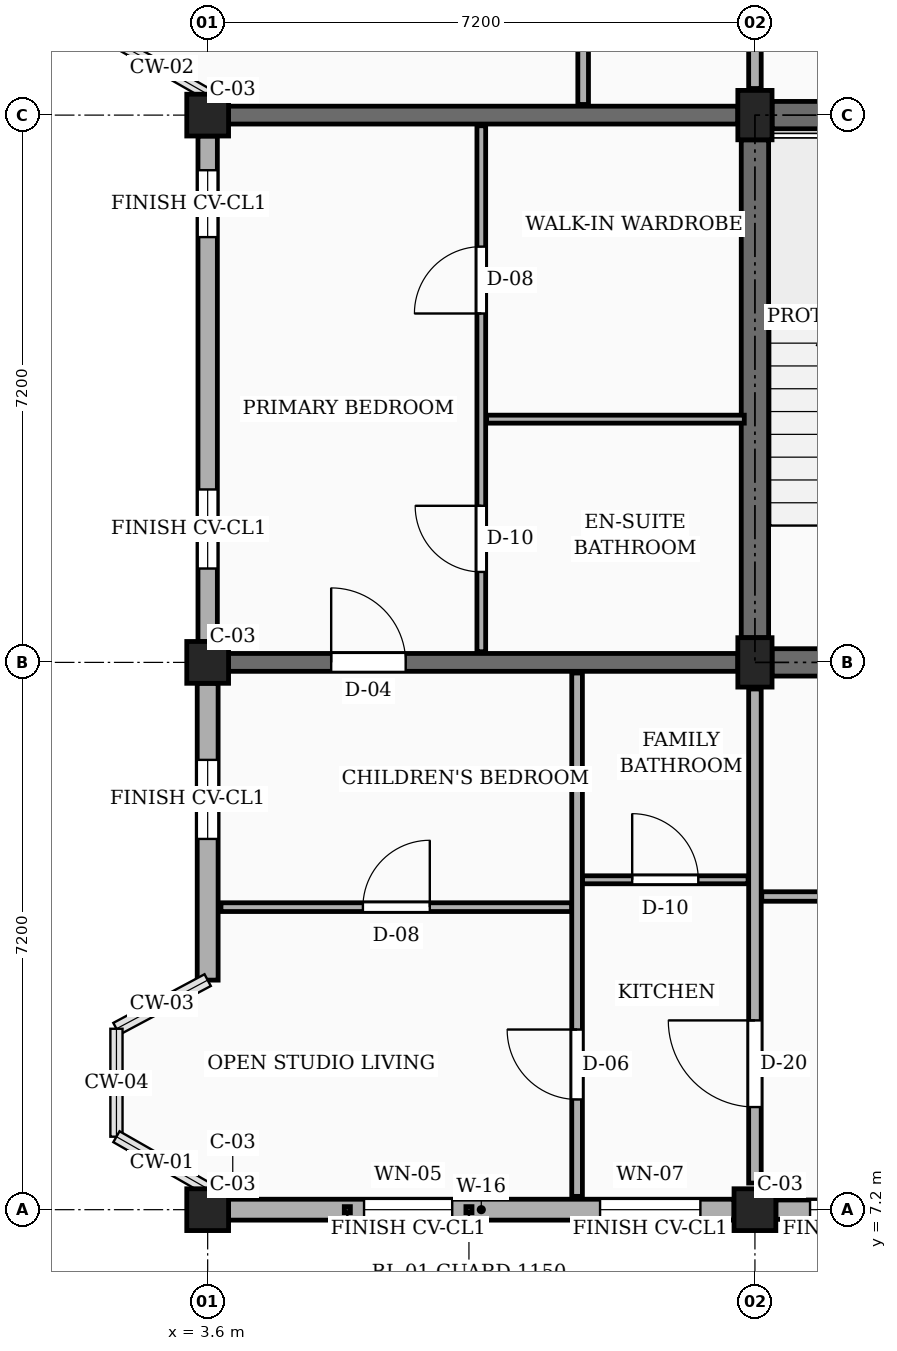
"""IFC4 building model, lengths in metres.
Left out: names, types, materials, properties, quantities, classifications, styles, units other than length and angle.
Written with IfcOpenShell. Run it as: python <this file> out.ifc"""

import sys

from ifc_helpers import new_model, si_unit, direction, frame, frame_2d, origin, origin_2d, place, context, subcontext, project, spatial, rectangle, extrude, element, fill, save


model = new_model("IFC4")
c1 = context("Model", 3, precision=1e-05, world=origin(), true_north=direction((0.0, 1.0)))
c2 = subcontext(c1, "Body", "Model", "MODEL_VIEW")
j1 = project(units=[si_unit("LENGTHUNIT", "METRE"), si_unit("PLANEANGLEUNIT", "RADIAN")], contexts=[c1])
p1 = place(None, origin())
s1 = spatial("IfcSite", under=j1, at=p1, CompositionType="ELEMENT")
p2 = place(p1, origin())
s2 = spatial("IfcBuilding", under=s1, at=p2, CompositionType="ELEMENT")
p3 = place(p2, frame((0.0, 0.0, 13.95)))
s3 = spatial("IfcBuildingStorey", under=s2, at=p3, CompositionType="ELEMENT", Elevation=13.95)
for number, where, z_axis, x_axis in (
    (1, (3.6, 7.2, 0.0), (0.0, 0.0, 1.0), (1.0, 0.0, 0.0)),
    (2, (3.6, 14.4, 0.0), (0.0, 0.0, 1.0), (1.0, 0.0, 0.0)),
    (3, (3.6, 21.6, 0.0), (0.0, 0.0, 1.0), (1.0, 0.0, 0.0)),
    (4, (10.8, 7.2, 0.0), (0.0, 0.0, 1.0), (1.0, 0.0, 0.0)),
):
    element("IfcColumn", number, at=place(p3, frame(where, z_axis=z_axis, x_axis=x_axis)), inside=s3, PredefinedType="COLUMN", context=c2, shape_type="SweptSolid", body=[
        extrude(rectangle(XDim=0.55, YDim=0.55, at=origin_2d()), origin(), (0.0, 0.0, 1.0), 3.15),
    ])
for number, where, z_axis, x_axis in (
    (5, (10.8, 14.4, 0.0), (0.0, 0.0, 1.0), (1.0, 0.0, 0.0)),
    (6, (10.8, 21.6, 0.0), (0.0, 0.0, 1.0), (1.0, 0.0, 0.0)),
):
    element("IfcColumn", number, at=place(p3, frame(where, z_axis=z_axis, x_axis=x_axis)), inside=s3, PredefinedType="COLUMN", context=c2, shape_type="SweptSolid", body=[
        extrude(rectangle(XDim=0.45, YDim=0.65, at=origin_2d()), origin(), (0.0, 0.0, 1.0), 3.15),
    ])
p4 = place(p3, frame((3.875, 14.4, 0.0), z_axis=(0.0, 0.0, 1.0), x_axis=(1.0, 0.0, 0.0)))
e7 = element("IfcWall", 7, at=p4, inside=s3, PredefinedType="SOLIDWALL", context=c2, shape_type="SweptSolid", body=[
    extrude(rectangle(XDim=6.7, YDim=0.235, at=frame_2d((3.35, 0.0))), origin(), (0.0, 0.0, 1.0), 2.17),
])
p5 = place(p4, frame((1.35, 0.0, 0.0)))
e8 = element("IfcOpeningElement", 8, at=p5, cuts=e7, PredefinedType="OPENING", context=c2, shape_type="SweptSolid", body=[
    extrude(rectangle(XDim=0.98, YDim=2.12, at=frame_2d((0.49, 1.06))), frame((0.0, 0.127, 0.0), z_axis=(0.0, -1.0, 0.0), x_axis=(1.0, 0.0, 0.0)), (0.0, 0.0, 1.0), 0.255),
])
p6 = place(p3, frame((3.875, 21.6, 0.0), z_axis=(0.0, 0.0, 1.0), x_axis=(1.0, 0.0, 0.0)))
e9 = element("IfcWall", 9, at=p6, inside=s3, PredefinedType="SOLIDWALL", context=c2, shape_type="SweptSolid", body=[
    extrude(rectangle(XDim=6.7, YDim=0.235, at=frame_2d((3.35, 0.0))), origin(), (0.0, 0.0, 1.0), 2.17),
])
p7 = place(p3, frame((3.875, 7.2, 0.0), z_axis=(0.0, 0.0, 1.0), x_axis=(1.0, 0.0, 0.0)))
e10 = element("IfcWall", 10, at=p7, inside=s3, PredefinedType="SOLIDWALL", context=c2, shape_type="SweptSolid", body=[
    extrude(rectangle(XDim=6.65, YDim=0.275, at=frame_2d((3.325, 0.0))), origin(), (0.0, 0.0, 1.0), 2.44),
])
p8 = place(p7, frame((1.782, 0.0, 0.78)))
e11 = element("IfcOpeningElement", 11, at=p8, cuts=e10, PredefinedType="OPENING", context=c2, shape_type="SweptSolid", body=[
    extrude(rectangle(XDim=1.16, YDim=1.15, at=frame_2d((0.58, 0.575))), frame((0.0, 0.147, 0.0), z_axis=(0.0, -1.0, 0.0), x_axis=(1.0, 0.0, 0.0)), (0.0, 0.0, 1.0), 0.295),
])
p9 = place(p7, frame((4.887, 0.0, 0.78)))
e12 = element("IfcOpeningElement", 12, at=p9, cuts=e10, PredefinedType="OPENING", context=c2, shape_type="SweptSolid", body=[
    extrude(rectangle(XDim=1.32, YDim=1.15, at=frame_2d((0.66, 0.575))), frame((0.0, 0.147, 0.0), z_axis=(0.0, -1.0, 0.0), x_axis=(1.0, 0.0, 0.0)), (0.0, 0.0, 1.0), 0.295),
])
p10 = place(p3, frame((11.075, 7.2, 0.0), z_axis=(0.0, 0.0, 1.0), x_axis=(1.0, 0.0, 0.0)))
e13 = element("IfcWall", 13, at=p10, inside=s3, PredefinedType="SOLIDWALL", context=c2, shape_type="SweptSolid", body=[
    extrude(rectangle(XDim=6.65, YDim=0.255, at=frame_2d((3.325, 0.0))), origin(), (0.0, 0.0, 1.0), 2.44),
])
p11 = place(p10, frame((0.45, 0.0, 0.78)))
e14 = element("IfcOpeningElement", 14, at=p11, cuts=e13, PredefinedType="OPENING", context=c2, shape_type="SweptSolid", body=[
    extrude(rectangle(XDim=1.32, YDim=1.15, at=frame_2d((0.66, 0.575))), frame((0.0, 0.137, 0.0), z_axis=(0.0, -1.0, 0.0), x_axis=(1.0, 0.0, 0.0)), (0.0, 0.0, 1.0), 0.275),
])
p12 = place(p10, frame((4.65, 0.0, 0.78)))
e15 = element("IfcOpeningElement", 15, at=p12, cuts=e13, PredefinedType="OPENING", context=c2, shape_type="SweptSolid", body=[
    extrude(rectangle(XDim=0.88, YDim=1.26, at=frame_2d((0.44, 0.63))), frame((0.0, 0.137, 0.0), z_axis=(0.0, -1.0, 0.0), x_axis=(1.0, 0.0, 0.0)), (0.0, 0.0, 1.0), 0.275),
])
p13 = place(p3, frame((3.6, 21.325, 0.0), z_axis=(0.0, 0.0, 1.0), x_axis=(0.0, -1.0, 0.0)))
e16 = element("IfcWall", 16, at=p13, inside=s3, PredefinedType="SOLIDWALL", context=c2, shape_type="SweptSolid", body=[
    extrude(rectangle(XDim=6.65, YDim=0.255, at=frame_2d((3.325, 0.0))), origin(), (0.0, 0.0, 1.0), 2.44),
])
p14 = place(p13, frame((0.45, 0.0, 0.78)))
e17 = element("IfcOpeningElement", 17, at=p14, cuts=e16, PredefinedType="OPENING", context=c2, shape_type="SweptSolid", body=[
    extrude(rectangle(XDim=0.88, YDim=1.26, at=frame_2d((0.44, 0.63))), frame((0.0, 0.137, 0.0), z_axis=(0.0, -1.0, 0.0), x_axis=(1.0, 0.0, 0.0)), (0.0, 0.0, 1.0), 0.275),
])
p15 = place(p13, frame((4.65, 0.0, 0.78)))
e18 = element("IfcOpeningElement", 18, at=p15, cuts=e16, PredefinedType="OPENING", context=c2, shape_type="SweptSolid", body=[
    extrude(rectangle(XDim=1.04, YDim=1.26, at=frame_2d((0.52, 0.63))), frame((0.0, 0.137, 0.0), z_axis=(0.0, -1.0, 0.0), x_axis=(1.0, 0.0, 0.0)), (0.0, 0.0, 1.0), 0.275),
])
p16 = place(p3, frame((3.6, 14.125, 0.0), z_axis=(0.0, 0.0, 1.0), x_axis=(0.0, -1.0, 0.0)))
e19 = element("IfcWall", 19, at=p16, inside=s3, PredefinedType="SOLIDWALL", context=c2, shape_type="SweptSolid", body=[
    extrude(rectangle(XDim=3.905, YDim=0.275, at=frame_2d((1.953, 0.0))), origin(), (0.0, 0.0, 1.0), 2.44),
])
p17 = place(p16, frame((1.008, 0.0, 0.78)))
e20 = element("IfcOpeningElement", 20, at=p17, cuts=e19, PredefinedType="OPENING", context=c2, shape_type="SweptSolid", body=[
    extrude(rectangle(XDim=1.04, YDim=1.26, at=frame_2d((0.52, 0.63))), frame((0.0, 0.147, 0.0), z_axis=(0.0, -1.0, 0.0), x_axis=(1.0, 0.0, 0.0)), (0.0, 0.0, 1.0), 0.295),
])
p18 = place(p3, frame((10.8, 14.725, 0.0), z_axis=(0.0, 0.0, 1.0), x_axis=(0.0, 1.0, 0.0)))
e21 = element("IfcWall", 21, at=p18, inside=s3, PredefinedType="SHEAR", context=c2, shape_type="SweptSolid", body=[
    extrude(rectangle(XDim=6.55, YDim=0.36, at=frame_2d((3.275, 0.0))), origin(), (0.0, 0.0, 1.0), 2.87),
])
for number, where, z_axis, x_axis in (
    (22, (11.025, 21.6, 0.0), (0.0, 0.0, 1.0), (1.0, 0.0, 0.0)),
    (23, (11.025, 14.4, 0.0), (0.0, 0.0, 1.0), (1.0, 0.0, 0.0)),
):
    element("IfcWall", number, at=place(p3, frame(where, z_axis=z_axis, x_axis=x_axis)), inside=s3, PredefinedType="SHEAR", context=c2, shape_type="SweptSolid", body=[
        extrude(rectangle(XDim=6.75, YDim=0.36, at=frame_2d((3.375, 0.0))), origin(), (0.0, 0.0, 1.0), 2.87),
    ])
p19 = place(p3, frame((10.8, 7.55, 0.0), z_axis=(0.0, 0.0, 1.0), x_axis=(0.0, 1.0, 0.0)))
e24 = element("IfcWall", 24, at=p19, inside=s3, PredefinedType="PARTITIONING", context=c2, shape_type="SweptSolid", body=[
    extrude(rectangle(XDim=6.5, YDim=0.165, at=frame_2d((3.25, 0.0))), origin(), (0.0, 0.0, 1.0), 2.305),
])
p20 = place(p19, frame((1.0, 0.0, 0.0)))
e25 = element("IfcOpeningElement", 25, at=p20, cuts=e24, PredefinedType="OPENING", context=c2, shape_type="SweptSolid", body=[
    extrude(rectangle(XDim=1.14, YDim=2.18, at=frame_2d((0.57, 1.09))), frame((0.0, 0.093, 0.0), z_axis=(0.0, -1.0, 0.0), x_axis=(1.0, 0.0, 0.0)), (0.0, 0.0, 1.0), 0.185),
])
p21 = place(p3, frame((10.8, 21.95, 0.0), z_axis=(0.0, 0.0, 1.0), x_axis=(0.0, 1.0, 0.0)))
e26 = element("IfcWall", 26, at=p21, inside=s3, PredefinedType="PARTITIONING", context=c2, shape_type="SweptSolid", body=[
    extrude(rectangle(XDim=6.5, YDim=0.165, at=frame_2d((3.25, 0.0))), origin(), (0.0, 0.0, 1.0), 2.305),
])
p22 = place(p21, frame((1.0, 0.0, 0.0)))
e27 = element("IfcOpeningElement", 27, at=p22, cuts=e26, PredefinedType="OPENING", context=c2, shape_type="SweptSolid", body=[
    extrude(rectangle(XDim=1.0, YDim=2.15, at=frame_2d((0.5, 1.075))), frame((0.0, 0.093, 0.0), z_axis=(0.0, -1.0, 0.0), x_axis=(1.0, 0.0, 0.0)), (0.0, 0.0, 1.0), 0.185),
])
p23 = place(p3, frame((10.89, 11.32, 0.0), z_axis=(0.0, 0.0, 1.0), x_axis=(1.0, 0.0, 0.0)))
e28 = element("IfcWall", 28, at=p23, inside=s3, PredefinedType="PARTITIONING", context=c2, shape_type="SweptSolid", body=[
    extrude(rectangle(XDim=7.02, YDim=0.125, at=frame_2d((3.51, 0.0))), origin(), (0.0, 0.0, 1.0), 2.305),
])
p24 = place(p23, frame((2.85, 0.0, 0.0)))
e29 = element("IfcOpeningElement", 29, at=p24, cuts=e28, PredefinedType="OPENING", context=c2, shape_type="SweptSolid", body=[
    extrude(rectangle(XDim=1.02, YDim=2.15, at=frame_2d((0.51, 1.075))), frame((0.0, 0.073, 0.0), z_axis=(0.0, -1.0, 0.0), x_axis=(1.0, 0.0, 0.0)), (0.0, 0.0, 1.0), 0.145),
])
p25 = place(p3, frame((3.775, 11.18, 0.0), z_axis=(0.0, 0.0, 1.0), x_axis=(1.0, 0.0, 0.0)))
e30 = element("IfcWall", 30, at=p25, inside=s3, PredefinedType="PARTITIONING", context=c2, shape_type="SweptSolid", body=[
    extrude(rectangle(XDim=4.615, YDim=0.115, at=frame_2d((2.308, 0.0))), origin(), (0.0, 0.0, 1.0), 2.305),
])
p26 = place(p25, frame((1.867, 0.0, 0.0)))
e31 = element("IfcOpeningElement", 31, at=p26, cuts=e30, PredefinedType="OPENING", context=c2, shape_type="SweptSolid", body=[
    extrude(rectangle(XDim=0.88, YDim=2.08, at=frame_2d((0.44, 1.04))), frame((0.0, 0.067, 0.0), z_axis=(0.0, -1.0, 0.0), x_axis=(1.0, 0.0, 0.0)), (0.0, 0.0, 1.0), 0.135),
])
p27 = place(p3, frame((8.53, 11.54, 0.0), z_axis=(0.0, 0.0, 1.0), x_axis=(1.0, 0.0, 0.0)))
e32 = element("IfcWall", 32, at=p27, inside=s3, PredefinedType="PARTITIONING", context=c2, shape_type="SweptSolid", body=[
    extrude(rectangle(XDim=2.18, YDim=0.105, at=frame_2d((1.09, 0.0))), origin(), (0.0, 0.0, 1.0), 2.305),
])
p28 = place(p27, frame((0.655, 0.0, 0.0)))
e33 = element("IfcOpeningElement", 33, at=p28, cuts=e32, PredefinedType="OPENING", context=c2, shape_type="SweptSolid", body=[
    extrude(rectangle(XDim=0.87, YDim=2.05, at=frame_2d((0.435, 1.025))), frame((0.0, 0.062, 0.0), z_axis=(0.0, -1.0, 0.0), x_axis=(1.0, 0.0, 0.0)), (0.0, 0.0, 1.0), 0.125),
])
p29 = place(p3, frame((8.46, 7.375, 0.0), z_axis=(0.0, 0.0, 1.0), x_axis=(0.0, 1.0, 0.0)))
e34 = element("IfcWall", 34, at=p29, inside=s3, PredefinedType="PARTITIONING", context=c2, shape_type="SweptSolid", body=[
    extrude(rectangle(XDim=6.885, YDim=0.14, at=frame_2d((3.442, 0.0))), origin(), (0.0, 0.0, 1.0), 2.305),
])
p30 = place(p29, frame((1.275, 0.0, 0.0)))
e35 = element("IfcOpeningElement", 35, at=p30, cuts=e34, PredefinedType="OPENING", context=c2, shape_type="SweptSolid", body=[
    extrude(rectangle(XDim=0.92, YDim=2.1, at=frame_2d((0.46, 1.05))), frame((0.0, 0.08, 0.0), z_axis=(0.0, -1.0, 0.0), x_axis=(1.0, 0.0, 0.0)), (0.0, 0.0, 1.0), 0.16),
])
p31 = place(p3, frame((7.2, 14.54, 0.0), z_axis=(0.0, 0.0, 1.0), x_axis=(0.0, 1.0, 0.0)))
e36 = element("IfcWall", 36, at=p31, inside=s3, PredefinedType="PARTITIONING", context=c2, shape_type="SweptSolid", body=[
    extrude(rectangle(XDim=6.92, YDim=0.115, at=frame_2d((3.46, 0.0))), origin(), (0.0, 0.0, 1.0), 2.305),
])
p32 = place(p31, frame((1.05, 0.0, 0.0)))
e37 = element("IfcOpeningElement", 37, at=p32, cuts=e36, PredefinedType="OPENING", context=c2, shape_type="SweptSolid", body=[
    extrude(rectangle(XDim=0.87, YDim=2.05, at=frame_2d((0.435, 1.025))), frame((0.0, 0.067, 0.0), z_axis=(0.0, -1.0, 0.0), x_axis=(1.0, 0.0, 0.0)), (0.0, 0.0, 1.0), 0.135),
])
p33 = place(p31, frame((4.45, 0.0, 0.0)))
e38 = element("IfcOpeningElement", 38, at=p33, cuts=e36, PredefinedType="OPENING", context=c2, shape_type="SweptSolid", body=[
    extrude(rectangle(XDim=0.88, YDim=2.08, at=frame_2d((0.44, 1.04))), frame((0.0, 0.067, 0.0), z_axis=(0.0, -1.0, 0.0), x_axis=(1.0, 0.0, 0.0)), (0.0, 0.0, 1.0), 0.135),
])
p34 = place(p3, frame((7.27, 17.6, 0.0), z_axis=(0.0, 0.0, 1.0), x_axis=(1.0, 0.0, 0.0)))
e39 = element("IfcWall", 39, at=p34, inside=s3, PredefinedType="PARTITIONING", context=c2, shape_type="SweptSolid", body=[
    extrude(rectangle(XDim=3.39, YDim=0.105, at=frame_2d((1.695, 0.0))), origin(), (0.0, 0.0, 1.0), 2.305),
])
p35 = place(p3, frame((8.54, 21.74, 0.0), z_axis=(0.0, 0.0, 1.0), x_axis=(0.0, 1.0, 0.0)))
e40 = element("IfcWall", 40, at=p35, inside=s3, PredefinedType="PARTITIONING", context=c2, shape_type="SweptSolid", body=[
    extrude(rectangle(XDim=6.92, YDim=0.14, at=frame_2d((3.46, 0.0))), origin(), (0.0, 0.0, 1.0), 2.305),
])
p36 = place(p35, frame((1.31, 0.0, 0.0)))
e41 = element("IfcOpeningElement", 41, at=p36, cuts=e40, PredefinedType="OPENING", context=c2, shape_type="SweptSolid", body=[
    extrude(rectangle(XDim=0.95, YDim=2.1, at=frame_2d((0.475, 1.05))), frame((0.0, 0.08, 0.0), z_axis=(0.0, -1.0, 0.0), x_axis=(1.0, 0.0, 0.0)), (0.0, 0.0, 1.0), 0.16),
])
p37 = place(p8, origin())
e42 = element("IfcWindow", 42, at=p37, inside=s3, PartitioningType="SINGLE_PANEL", PredefinedType="WINDOW", context=c2, shape_type="SweptSolid", body=[
    extrude(rectangle(XDim=1.16, YDim=1.15, at=frame_2d((0.58, 0.575))), frame((0.0, 0.03, 0.0), z_axis=(0.0, -1.0, 0.0), x_axis=(1.0, 0.0, 0.0)), (0.0, 0.0, 1.0), 0.06),
])
fill(e11, e42)
p38 = place(p9, origin())
e43 = element("IfcWindow", 43, at=p38, inside=s3, PartitioningType="SINGLE_PANEL", PredefinedType="WINDOW", context=c2, shape_type="SweptSolid", body=[
    extrude(rectangle(XDim=1.32, YDim=1.15, at=frame_2d((0.66, 0.575))), frame((0.0, 0.03, 0.0), z_axis=(0.0, -1.0, 0.0), x_axis=(1.0, 0.0, 0.0)), (0.0, 0.0, 1.0), 0.06),
])
fill(e12, e43)
p39 = place(p11, origin())
e44 = element("IfcWindow", 44, at=p39, inside=s3, PartitioningType="SINGLE_PANEL", PredefinedType="WINDOW", context=c2, shape_type="SweptSolid", body=[
    extrude(rectangle(XDim=1.32, YDim=1.15, at=frame_2d((0.66, 0.575))), frame((0.0, 0.03, 0.0), z_axis=(0.0, -1.0, 0.0), x_axis=(1.0, 0.0, 0.0)), (0.0, 0.0, 1.0), 0.06),
])
fill(e14, e44)
p40 = place(p14, origin())
e45 = element("IfcWindow", 45, at=p40, inside=s3, PartitioningType="SINGLE_PANEL", PredefinedType="WINDOW", context=c2, shape_type="SweptSolid", body=[
    extrude(rectangle(XDim=0.88, YDim=1.26, at=frame_2d((0.44, 0.63))), frame((0.0, 0.03, 0.0), z_axis=(0.0, -1.0, 0.0), x_axis=(1.0, 0.0, 0.0)), (0.0, 0.0, 1.0), 0.06),
])
fill(e17, e45)
p41 = place(p15, origin())
e46 = element("IfcWindow", 46, at=p41, inside=s3, PartitioningType="SINGLE_PANEL", PredefinedType="WINDOW", context=c2, shape_type="SweptSolid", body=[
    extrude(rectangle(XDim=1.04, YDim=1.26, at=frame_2d((0.52, 0.63))), frame((0.0, 0.03, 0.0), z_axis=(0.0, -1.0, 0.0), x_axis=(1.0, 0.0, 0.0)), (0.0, 0.0, 1.0), 0.06),
])
fill(e18, e46)
p42 = place(p17, origin())
e47 = element("IfcWindow", 47, at=p42, inside=s3, PartitioningType="SINGLE_PANEL", PredefinedType="WINDOW", context=c2, shape_type="SweptSolid", body=[
    extrude(rectangle(XDim=1.04, YDim=1.26, at=frame_2d((0.52, 0.63))), frame((0.0, 0.03, 0.0), z_axis=(0.0, -1.0, 0.0), x_axis=(1.0, 0.0, 0.0)), (0.0, 0.0, 1.0), 0.06),
])
fill(e20, e47)
p43 = place(p20, origin())
e48 = element("IfcDoor", 48, at=p43, inside=s3, OperationType="SINGLE_SWING_RIGHT", PredefinedType="DOOR", context=c2, shape_type="SweptSolid", body=[
    extrude(rectangle(XDim=1.14, YDim=2.18, at=frame_2d((0.57, 1.09))), frame((0.0, 0.025, 0.0), z_axis=(0.0, -1.0, 0.0), x_axis=(1.0, 0.0, 0.0)), (0.0, 0.0, 1.0), 0.05),
])
fill(e25, e48)
p44 = place(p26, origin())
e49 = element("IfcDoor", 49, at=p44, inside=s3, OperationType="SINGLE_SWING_RIGHT", PredefinedType="DOOR", context=c2, shape_type="SweptSolid", body=[
    extrude(rectangle(XDim=0.88, YDim=2.08, at=frame_2d((0.44, 1.04))), frame((0.0, 0.025, 0.0), z_axis=(0.0, -1.0, 0.0), x_axis=(1.0, 0.0, 0.0)), (0.0, 0.0, 1.0), 0.05),
])
fill(e31, e49)
p45 = place(p28, origin())
e50 = element("IfcDoor", 50, at=p45, inside=s3, OperationType="SINGLE_SWING_LEFT", PredefinedType="DOOR", context=c2, shape_type="SweptSolid", body=[
    extrude(rectangle(XDim=0.87, YDim=2.05, at=frame_2d((0.435, 1.025))), frame((0.0, 0.025, 0.0), z_axis=(0.0, -1.0, 0.0), x_axis=(1.0, 0.0, 0.0)), (0.0, 0.0, 1.0), 0.05),
])
fill(e33, e50)
p46 = place(p30, origin())
e51 = element("IfcDoor", 51, at=p46, inside=s3, OperationType="SINGLE_SWING_RIGHT", PredefinedType="DOOR", context=c2, shape_type="SweptSolid", body=[
    extrude(rectangle(XDim=0.92, YDim=2.1, at=frame_2d((0.46, 1.05))), frame((0.0, 0.025, 0.0), z_axis=(0.0, -1.0, 0.0), x_axis=(1.0, 0.0, 0.0)), (0.0, 0.0, 1.0), 0.05),
])
fill(e35, e51)
p47 = place(p32, origin())
e52 = element("IfcDoor", 52, at=p47, inside=s3, OperationType="SINGLE_SWING_RIGHT", PredefinedType="DOOR", context=c2, shape_type="SweptSolid", body=[
    extrude(rectangle(XDim=0.87, YDim=2.05, at=frame_2d((0.435, 1.025))), frame((0.0, 0.025, 0.0), z_axis=(0.0, -1.0, 0.0), x_axis=(1.0, 0.0, 0.0)), (0.0, 0.0, 1.0), 0.05),
])
fill(e37, e52)
p48 = place(p33, origin())
e53 = element("IfcDoor", 53, at=p48, inside=s3, OperationType="SINGLE_SWING_LEFT", PredefinedType="DOOR", context=c2, shape_type="SweptSolid", body=[
    extrude(rectangle(XDim=0.88, YDim=2.08, at=frame_2d((0.44, 1.04))), frame((0.0, 0.025, 0.0), z_axis=(0.0, -1.0, 0.0), x_axis=(1.0, 0.0, 0.0)), (0.0, 0.0, 1.0), 0.05),
])
fill(e38, e53)
p49 = place(p5, origin())
e54 = element("IfcDoor", 54, at=p49, inside=s3, OperationType="SINGLE_SWING_LEFT", PredefinedType="DOOR", context=c2, shape_type="SweptSolid", body=[
    extrude(rectangle(XDim=0.98, YDim=2.12, at=frame_2d((0.49, 1.06))), frame((0.0, 0.025, 0.0), z_axis=(0.0, -1.0, 0.0), x_axis=(1.0, 0.0, 0.0)), (0.0, 0.0, 1.0), 0.05),
])
fill(e8, e54)
save(model, sys.argv[1])
